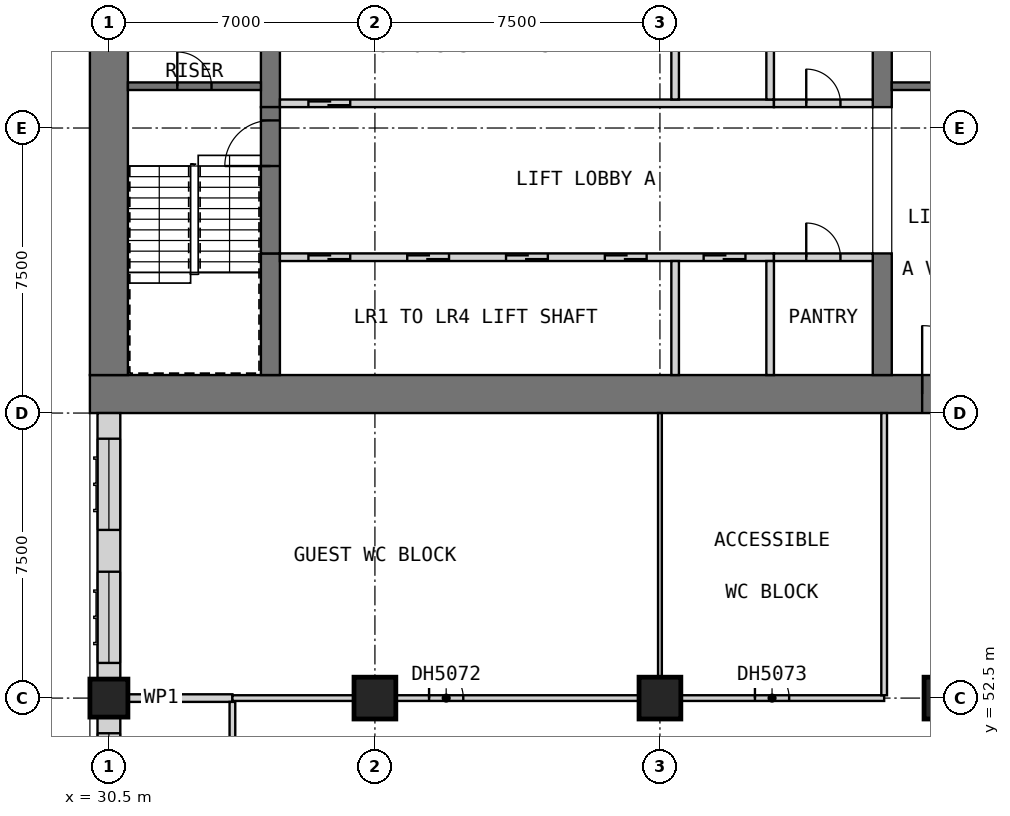
"""IFC4 building model, lengths in metres.
Left out: names, types, materials, properties, quantities, classifications, styles, units other than length and angle.
Written with IfcOpenShell. Run it as: python <this file> out.ifc"""

import sys

from ifc_helpers import new_model, si_unit, direction, frame, frame_2d, origin, origin_2d, place, context, subcontext, project, spatial, rectangle, extrude, element, fill, save


model = new_model("IFC4")
c1 = context("Model", 3, precision=1e-05, world=origin(), true_north=direction((0.0, 1.0)))
c2 = subcontext(c1, "Body", "Model", "MODEL_VIEW")
j1 = project(units=[si_unit("LENGTHUNIT", "METRE"), si_unit("PLANEANGLEUNIT", "RADIAN")], contexts=[c1])
p1 = place(None, origin())
s1 = spatial("IfcSite", under=j1, at=p1, CompositionType="ELEMENT")
p2 = place(p1, origin())
s2 = spatial("IfcBuilding", under=s1, at=p2, CompositionType="ELEMENT")
p3 = place(p2, frame((0.0, 0.0, 79.1)))
s3 = spatial("IfcBuildingStorey", under=s2, at=p3, CompositionType="ELEMENT", Elevation=79.1)
p4 = place(p3, frame((30.5, 52.5, 0.0), z_axis=(0.0, 0.0, 1.0), x_axis=(1.0, 0.0, 0.0)))
e1 = element("IfcColumn", 1, at=p4, inside=s3, PredefinedType="COLUMN", context=c2, shape_type="SweptSolid", body=[
    extrude(rectangle(XDim=1.0, YDim=1.0, at=origin_2d()), origin(), (0.0, 0.0, 1.0), 3.6),
])
for number, where, z_axis, x_axis in (
    (2, (37.5, 52.5, 0.0), (0.0, 0.0, 1.0), (1.0, 0.0, 0.0)),
    (3, (45.0, 52.5, 0.0), (0.0, 0.0, 1.0), (1.0, 0.0, 0.0)),
    (4, (52.5, 52.5, 0.0), (0.0, 0.0, 1.0), (1.0, 0.0, 0.0)),
):
    element("IfcColumn", number, at=place(p3, frame(where, z_axis=z_axis, x_axis=x_axis)), inside=s3, PredefinedType="COLUMN", context=c2, shape_type="SweptSolid", body=[
        extrude(rectangle(XDim=1.1, YDim=1.1, at=origin_2d()), origin(), (0.0, 0.0, 1.0), 3.6),
    ])
p5 = place(p3, frame((30.0, 60.5, 0.0), z_axis=(0.0, 0.0, 1.0), x_axis=(1.0, 0.0, 0.0)))
e5 = element("IfcWall", 5, at=p5, inside=s3, PredefinedType="SHEAR", context=c2, shape_type="SweptSolid", body=[
    extrude(rectangle(XDim=30.0, YDim=1.0, at=frame_2d((15.0, 0.0))), origin(), (0.0, 0.0, 1.0), 3.6),
])
p6 = place(p5, frame((21.9, 0.0, 0.0)))
e6 = element("IfcOpeningElement", 6, at=p6, cuts=e5, PredefinedType="OPENING", context=c2, shape_type="SweptSolid", body=[
    extrude(rectangle(XDim=1.8, YDim=2.1, at=frame_2d((0.9, 1.05))), frame((0.0, 0.51, 0.0), z_axis=(0.0, -1.0, 0.0), x_axis=(1.0, 0.0, 0.0)), (0.0, 0.0, 1.0), 1.02),
])
p7 = place(p5, frame((26.5, 0.0, 0.0)))
e7 = element("IfcOpeningElement", 7, at=p7, cuts=e5, PredefinedType="OPENING", context=c2, shape_type="SweptSolid", body=[
    extrude(rectangle(XDim=1.2, YDim=2.1, at=frame_2d((0.6, 1.05))), frame((0.0, 0.51, 0.0), z_axis=(0.0, -1.0, 0.0), x_axis=(1.0, 0.0, 0.0)), (0.0, 0.0, 1.0), 1.02),
])
p8 = place(p3, frame((30.5, 61.0, 0.0), z_axis=(0.0, 0.0, 1.0), x_axis=(0.0, 1.0, 0.0)))
e8 = element("IfcWall", 8, at=p8, inside=s3, PredefinedType="SHEAR", context=c2, shape_type="SweptSolid", body=[
    extrude(rectangle(XDim=20.5, YDim=1.0, at=frame_2d((10.25, 0.0))), origin(), (0.0, 0.0, 1.0), 3.6),
])
p9 = place(p3, frame((34.75, 61.0, 0.0), z_axis=(0.0, 0.0, 1.0), x_axis=(0.0, 1.0, 0.0)))
e9 = element("IfcWall", 9, at=p9, inside=s3, PredefinedType="SHEAR", context=c2, shape_type="SweptSolid", body=[
    extrude(rectangle(XDim=3.2, YDim=0.5, at=frame_2d((1.6, 0.0))), origin(), (0.0, 0.0, 1.0), 3.6),
])
p10 = place(p3, frame((34.75, 68.05, 0.0), z_axis=(0.0, 0.0, 1.0), x_axis=(0.0, 1.0, 0.0)))
e10 = element("IfcWall", 10, at=p10, inside=s3, PredefinedType="SHEAR", context=c2, shape_type="SweptSolid", body=[
    extrude(rectangle(XDim=6.4, YDim=0.5, at=frame_2d((3.2, 0.0))), origin(), (0.0, 0.0, 1.0), 3.6),
])
p11 = place(p3, frame((50.85, 61.0, 0.0), z_axis=(0.0, 0.0, 1.0), x_axis=(0.0, 1.0, 0.0)))
e11 = element("IfcWall", 11, at=p11, inside=s3, PredefinedType="SHEAR", context=c2, shape_type="SweptSolid", body=[
    extrude(rectangle(XDim=3.2, YDim=0.5, at=frame_2d((1.6, 0.0))), origin(), (0.0, 0.0, 1.0), 3.6),
])
p12 = place(p3, frame((50.85, 68.05, 0.0), z_axis=(0.0, 0.0, 1.0), x_axis=(0.0, 1.0, 0.0)))
e12 = element("IfcWall", 12, at=p12, inside=s3, PredefinedType="SHEAR", context=c2, shape_type="SweptSolid", body=[
    extrude(rectangle(XDim=6.4, YDim=0.5, at=frame_2d((3.2, 0.0))), origin(), (0.0, 0.0, 1.0), 3.6),
])
p13 = place(p2, frame((0.0, 0.0, 34.0)))
s4 = spatial("IfcBuildingStorey", under=s2, at=p13, CompositionType="ELEMENT", Elevation=34.0)
for number, where, z_axis, x_axis in (
    (13, (29.7, 61.05, 0.0), (0.0, 0.0, 1.0), (0.0, 1.0, 0.0)),
    (14, (29.7, 65.925, 0.0), (0.0, 0.0, 1.0), (0.0, 1.0, 0.0)),
):
    element("IfcWall", number, at=place(p13, frame(where, z_axis=z_axis, x_axis=x_axis)), inside=s4, PredefinedType="SOLIDWALL", context=c2, shape_type="SweptSolid", body=[
        extrude(rectangle(XDim=0.9, YDim=0.6, at=frame_2d((0.45, 0.0))), origin(), (0.0, 0.0, 1.0), 286.2),
    ])
p14 = place(p3, frame((30.5, 60.0, 0.0), z_axis=(0.0, 0.0, 1.0), x_axis=(0.0, -1.0, 0.0)))
e15 = element("IfcWall", 15, at=p14, inside=s3, PredefinedType="SOLIDWALL", context=c2, shape_type="SweptSolid", body=[
    extrude(rectangle(XDim=7.0, YDim=0.6, at=frame_2d((3.5, 0.0))), origin(), (0.0, 0.0, 1.0), 3.35),
])
p15 = place(p14, frame((4.175, 0.0, 0.8)))
e16 = element("IfcOpeningElement", 16, at=p15, cuts=e15, PredefinedType="OPENING", context=c2, shape_type="SweptSolid", body=[
    extrude(rectangle(XDim=2.4, YDim=1.8, at=frame_2d((1.2, 0.9))), frame((0.0, 0.31, 0.0), z_axis=(0.0, -1.0, 0.0), x_axis=(1.0, 0.0, 0.0)), (0.0, 0.0, 1.0), 0.62),
])
p16 = place(p14, frame((0.675, 0.0, 0.8)))
e17 = element("IfcOpeningElement", 17, at=p16, cuts=e15, PredefinedType="OPENING", context=c2, shape_type="SweptSolid", body=[
    extrude(rectangle(XDim=2.4, YDim=1.8, at=frame_2d((1.2, 0.9))), frame((0.0, 0.31, 0.0), z_axis=(0.0, -1.0, 0.0), x_axis=(1.0, 0.0, 0.0)), (0.0, 0.0, 1.0), 0.62),
])
p17 = place(p3, frame((30.5, 52.0, 0.0), z_axis=(0.0, 0.0, 1.0), x_axis=(0.0, -1.0, 0.0)))
e18 = element("IfcWall", 18, at=p17, inside=s3, PredefinedType="SOLIDWALL", context=c2, shape_type="SweptSolid", body=[
    extrude(rectangle(XDim=6.0, YDim=0.6, at=frame_2d((3.0, 0.0))), origin(), (0.0, 0.0, 1.0), 2.85),
])
p18 = place(p17, frame((3.425, 0.0, 0.8)))
e19 = element("IfcOpeningElement", 19, at=p18, cuts=e18, PredefinedType="OPENING", context=c2, shape_type="SweptSolid", body=[
    extrude(rectangle(XDim=2.4, YDim=1.8, at=frame_2d((1.2, 0.9))), frame((0.0, 0.31, 0.0), z_axis=(0.0, -1.0, 0.0), x_axis=(1.0, 0.0, 0.0)), (0.0, 0.0, 1.0), 0.62),
])
p19 = place(p17, frame((0.425, 0.0, 0.8)))
e20 = element("IfcOpeningElement", 20, at=p19, cuts=e18, PredefinedType="OPENING", context=c2, shape_type="SweptSolid", body=[
    extrude(rectangle(XDim=2.4, YDim=1.8, at=frame_2d((1.2, 0.9))), frame((0.0, 0.31, 0.0), z_axis=(0.0, -1.0, 0.0), x_axis=(1.0, 0.0, 0.0)), (0.0, 0.0, 1.0), 0.62),
])
p20 = place(p3, frame((35.0, 64.1, 0.0), z_axis=(0.0, 0.0, 1.0), x_axis=(1.0, 0.0, 0.0)))
e21 = element("IfcWall", 21, at=p20, inside=s3, PredefinedType="SOLIDWALL", context=c2, shape_type="SweptSolid", body=[
    extrude(rectangle(XDim=13.0, YDim=0.2, at=frame_2d((6.5, 0.0))), origin(), (0.0, 0.0, 1.0), 3.6),
])
p21 = place(p20, frame((0.75, 0.0, 0.0)))
e22 = element("IfcOpeningElement", 22, at=p21, cuts=e21, PredefinedType="OPENING", context=c2, shape_type="SweptSolid", body=[
    extrude(rectangle(XDim=1.1, YDim=2.1, at=frame_2d((0.55, 1.05))), frame((0.0, 0.11, 0.0), z_axis=(0.0, -1.0, 0.0), x_axis=(1.0, 0.0, 0.0)), (0.0, 0.0, 1.0), 0.22),
])
p22 = place(p20, frame((3.35, 0.0, 0.0)))
e23 = element("IfcOpeningElement", 23, at=p22, cuts=e21, PredefinedType="OPENING", context=c2, shape_type="SweptSolid", body=[
    extrude(rectangle(XDim=1.1, YDim=2.1, at=frame_2d((0.55, 1.05))), frame((0.0, 0.11, 0.0), z_axis=(0.0, -1.0, 0.0), x_axis=(1.0, 0.0, 0.0)), (0.0, 0.0, 1.0), 0.22),
])
p23 = place(p20, frame((5.95, 0.0, 0.0)))
e24 = element("IfcOpeningElement", 24, at=p23, cuts=e21, PredefinedType="OPENING", context=c2, shape_type="SweptSolid", body=[
    extrude(rectangle(XDim=1.1, YDim=2.1, at=frame_2d((0.55, 1.05))), frame((0.0, 0.11, 0.0), z_axis=(0.0, -1.0, 0.0), x_axis=(1.0, 0.0, 0.0)), (0.0, 0.0, 1.0), 0.22),
])
p24 = place(p20, frame((8.55, 0.0, 0.0)))
e25 = element("IfcOpeningElement", 25, at=p24, cuts=e21, PredefinedType="OPENING", context=c2, shape_type="SweptSolid", body=[
    extrude(rectangle(XDim=1.1, YDim=2.1, at=frame_2d((0.55, 1.05))), frame((0.0, 0.11, 0.0), z_axis=(0.0, -1.0, 0.0), x_axis=(1.0, 0.0, 0.0)), (0.0, 0.0, 1.0), 0.22),
])
p25 = place(p20, frame((11.15, 0.0, 0.0)))
e26 = element("IfcOpeningElement", 26, at=p25, cuts=e21, PredefinedType="OPENING", context=c2, shape_type="SweptSolid", body=[
    extrude(rectangle(XDim=1.1, YDim=2.1, at=frame_2d((0.55, 1.05))), frame((0.0, 0.11, 0.0), z_axis=(0.0, -1.0, 0.0), x_axis=(1.0, 0.0, 0.0)), (0.0, 0.0, 1.0), 0.22),
])
for number, where, z_axis, x_axis in (
    (27, (45.4, 61.0, 0.0), (0.0, 0.0, 1.0), (0.0, 1.0, 0.0)),
    (28, (47.9, 61.0, 0.0), (0.0, 0.0, 1.0), (0.0, 1.0, 0.0)),
):
    element("IfcWall", number, at=place(p3, frame(where, z_axis=z_axis, x_axis=x_axis)), inside=s3, PredefinedType="SOLIDWALL", context=c2, shape_type="SweptSolid", body=[
        extrude(rectangle(XDim=3.0, YDim=0.2, at=frame_2d((1.5, 0.0))), origin(), (0.0, 0.0, 1.0), 3.6),
    ])
p26 = place(p3, frame((48.0, 64.1, 0.0), z_axis=(0.0, 0.0, 1.0), x_axis=(1.0, 0.0, 0.0)))
e29 = element("IfcWall", 29, at=p26, inside=s3, PredefinedType="PARTITIONING", context=c2, shape_type="SweptSolid", body=[
    extrude(rectangle(XDim=2.6, YDim=0.2, at=frame_2d((1.3, 0.0))), origin(), (0.0, 0.0, 1.0), 3.35),
])
p27 = place(p26, frame((0.85, 0.0, 0.0)))
e30 = element("IfcOpeningElement", 30, at=p27, cuts=e29, PredefinedType="OPENING", context=c2, shape_type="SweptSolid", body=[
    extrude(rectangle(XDim=0.9, YDim=2.1, at=frame_2d((0.45, 1.05))), frame((0.0, 0.11, 0.0), z_axis=(0.0, -1.0, 0.0), x_axis=(1.0, 0.0, 0.0)), (0.0, 0.0, 1.0), 0.22),
])
p28 = place(p3, frame((35.0, 68.15, 0.0), z_axis=(0.0, 0.0, 1.0), x_axis=(1.0, 0.0, 0.0)))
e31 = element("IfcWall", 31, at=p28, inside=s3, PredefinedType="SOLIDWALL", context=c2, shape_type="SweptSolid", body=[
    extrude(rectangle(XDim=13.0, YDim=0.2, at=frame_2d((6.5, 0.0))), origin(), (0.0, 0.0, 1.0), 3.6),
])
p29 = place(p28, frame((0.75, 0.0, 0.0)))
e32 = element("IfcOpeningElement", 32, at=p29, cuts=e31, PredefinedType="OPENING", context=c2, shape_type="SweptSolid", body=[
    extrude(rectangle(XDim=1.1, YDim=2.1, at=frame_2d((0.55, 1.05))), frame((0.0, 0.11, 0.0), z_axis=(0.0, -1.0, 0.0), x_axis=(1.0, 0.0, 0.0)), (0.0, 0.0, 1.0), 0.22),
])
for number, where, z_axis, x_axis in (
    (33, (45.4, 68.25, 0.0), (0.0, 0.0, 1.0), (0.0, 1.0, 0.0)),
    (34, (47.9, 68.25, 0.0), (0.0, 0.0, 1.0), (0.0, 1.0, 0.0)),
):
    element("IfcWall", number, at=place(p3, frame(where, z_axis=z_axis, x_axis=x_axis)), inside=s3, PredefinedType="SOLIDWALL", context=c2, shape_type="SweptSolid", body=[
        extrude(rectangle(XDim=2.75, YDim=0.2, at=frame_2d((1.375, 0.0))), origin(), (0.0, 0.0, 1.0), 3.6),
    ])
p30 = place(p3, frame((48.0, 68.15, 0.0), z_axis=(0.0, 0.0, 1.0), x_axis=(1.0, 0.0, 0.0)))
e35 = element("IfcWall", 35, at=p30, inside=s3, PredefinedType="PARTITIONING", context=c2, shape_type="SweptSolid", body=[
    extrude(rectangle(XDim=2.6, YDim=0.2, at=frame_2d((1.3, 0.0))), origin(), (0.0, 0.0, 1.0), 3.35),
])
p31 = place(p30, frame((0.85, 0.0, 0.0)))
e36 = element("IfcOpeningElement", 36, at=p31, cuts=e35, PredefinedType="OPENING", context=c2, shape_type="SweptSolid", body=[
    extrude(rectangle(XDim=0.9, YDim=2.1, at=frame_2d((0.45, 1.05))), frame((0.0, 0.11, 0.0), z_axis=(0.0, -1.0, 0.0), x_axis=(1.0, 0.0, 0.0)), (0.0, 0.0, 1.0), 0.22),
])
p32 = place(p3, frame((34.75, 64.2, 0.0), z_axis=(0.0, 0.0, 1.0), x_axis=(0.0, 1.0, 0.0)))
e37 = element("IfcWall", 37, at=p32, inside=s3, PredefinedType="SOLIDWALL", context=c2, shape_type="SweptSolid", body=[
    extrude(rectangle(XDim=3.85, YDim=0.5, at=frame_2d((1.925, 0.0))), origin(), (0.0, 0.0, 1.0), 2.4),
])
p33 = place(p32, frame((2.3, 0.0, 0.0)))
e38 = element("IfcOpeningElement", 38, at=p33, cuts=e37, PredefinedType="OPENING", context=c2, shape_type="SweptSolid", body=[
    extrude(rectangle(XDim=1.2, YDim=2.1, at=frame_2d((0.6, 1.05))), frame((0.0, 0.26, 0.0), z_axis=(0.0, -1.0, 0.0), x_axis=(1.0, 0.0, 0.0)), (0.0, 0.0, 1.0), 0.52),
])
p34 = place(p3, frame((31.0, 68.6, 0.0), z_axis=(0.0, 0.0, 1.0), x_axis=(1.0, 0.0, 0.0)))
e39 = element("IfcWall", 39, at=p34, inside=s3, PredefinedType="SOLIDWALL", context=c2, shape_type="SweptSolid", body=[
    extrude(rectangle(XDim=3.5, YDim=0.2, at=frame_2d((1.75, 0.0))), origin(), (0.0, 0.0, 1.0), 3.35),
])
p35 = place(p34, frame((1.3, 0.0, 0.0)))
e40 = element("IfcOpeningElement", 40, at=p35, cuts=e39, PredefinedType="OPENING", context=c2, shape_type="SweptSolid", body=[
    extrude(rectangle(XDim=0.9, YDim=2.1, at=frame_2d((0.45, 1.05))), frame((0.0, 0.11, 0.0), z_axis=(0.0, -1.0, 0.0), x_axis=(1.0, 0.0, 0.0)), (0.0, 0.0, 1.0), 0.22),
])
p36 = place(p3, frame((51.1, 68.6, 0.0), z_axis=(0.0, 0.0, 1.0), x_axis=(1.0, 0.0, 0.0)))
e41 = element("IfcWall", 41, at=p36, inside=s3, PredefinedType="SOLIDWALL", context=c2, shape_type="SweptSolid", body=[
    extrude(rectangle(XDim=7.9, YDim=0.2, at=frame_2d((3.95, 0.0))), origin(), (0.0, 0.0, 1.0), 3.35),
])
p37 = place(p3, frame((30.0, 52.5, 0.0), z_axis=(0.0, 0.0, 1.0), x_axis=(1.0, 0.0, 0.0)))
e42 = element("IfcWall", 42, at=p37, inside=s3, PredefinedType="PARTITIONING", context=c2, shape_type="SweptSolid", body=[
    extrude(rectangle(XDim=3.75, YDim=0.2, at=frame_2d((1.875, 0.0))), origin(), (0.0, 0.0, 1.0), 3.35),
])
p38 = place(p3, frame((33.75, 52.5, 0.0), z_axis=(0.0, 0.0, 1.0), x_axis=(1.0, 0.0, 0.0)))
e43 = element("IfcWall", 43, at=p38, inside=s3, PredefinedType="PARTITIONING", context=c2, shape_type="SweptSolid", body=[
    extrude(rectangle(XDim=17.15, YDim=0.15, at=frame_2d((8.575, 0.0))), origin(), (0.0, 0.0, 1.0), 3.35),
])
p39 = place(p38, frame((5.175, 0.0, 0.0)))
e44 = element("IfcOpeningElement", 44, at=p39, cuts=e43, PredefinedType="OPENING", context=c2, shape_type="SweptSolid", body=[
    extrude(rectangle(XDim=0.9, YDim=2.1, at=frame_2d((0.45, 1.05))), frame((0.0, 0.085, 0.0), z_axis=(0.0, -1.0, 0.0), x_axis=(1.0, 0.0, 0.0)), (0.0, 0.0, 1.0), 0.17),
])
p40 = place(p38, frame((13.75, 0.0, 0.0)))
e45 = element("IfcOpeningElement", 45, at=p40, cuts=e43, PredefinedType="OPENING", context=c2, shape_type="SweptSolid", body=[
    extrude(rectangle(XDim=0.9, YDim=2.1, at=frame_2d((0.45, 1.05))), frame((0.0, 0.085, 0.0), z_axis=(0.0, -1.0, 0.0), x_axis=(1.0, 0.0, 0.0)), (0.0, 0.0, 1.0), 0.17),
])
p41 = place(p3, frame((33.75, 50.175, 0.0), z_axis=(0.0, 0.0, 1.0), x_axis=(0.0, 1.0, 0.0)))
e46 = element("IfcWall", 46, at=p41, inside=s3, PredefinedType="PARTITIONING", context=c2, shape_type="SweptSolid", body=[
    extrude(rectangle(XDim=2.225, YDim=0.15, at=frame_2d((1.112, 0.0))), origin(), (0.0, 0.0, 1.0), 3.35),
])
p42 = place(p3, frame((45.0, 52.575, 0.0), z_axis=(0.0, 0.0, 1.0), x_axis=(0.0, 1.0, 0.0)))
e47 = element("IfcWall", 47, at=p42, inside=s3, PredefinedType="PARTITIONING", context=c2, shape_type="SweptSolid", body=[
    extrude(rectangle(XDim=7.425, YDim=0.1, at=frame_2d((3.712, 0.0))), origin(), (0.0, 0.0, 1.0), 3.35),
])
p43 = place(p3, frame((50.9, 52.575, 0.0), z_axis=(0.0, 0.0, 1.0), x_axis=(0.0, 1.0, 0.0)))
e48 = element("IfcWall", 48, at=p43, inside=s3, PredefinedType="PARTITIONING", context=c2, shape_type="SweptSolid", body=[
    extrude(rectangle(XDim=7.425, YDim=0.15, at=frame_2d((3.712, 0.0))), origin(), (0.0, 0.0, 1.0), 3.35),
])
p44 = place(p15, origin())
e49 = element("IfcWindow", 49, at=p44, inside=s3, PartitioningType="SINGLE_PANEL", PredefinedType="WINDOW", context=c2, shape_type="SweptSolid", body=[
    extrude(rectangle(XDim=2.4, YDim=1.8, at=frame_2d((1.2, 0.9))), frame((0.0, -0.07, 0.0), z_axis=(0.0, -1.0, 0.0), x_axis=(1.0, 0.0, 0.0)), (0.0, 0.0, 1.0), 0.06),
])
fill(e16, e49)
p45 = place(p16, origin())
e50 = element("IfcWindow", 50, at=p45, inside=s3, PartitioningType="SINGLE_PANEL", PredefinedType="WINDOW", context=c2, shape_type="SweptSolid", body=[
    extrude(rectangle(XDim=2.4, YDim=1.8, at=frame_2d((1.2, 0.9))), frame((0.0, -0.07, 0.0), z_axis=(0.0, -1.0, 0.0), x_axis=(1.0, 0.0, 0.0)), (0.0, 0.0, 1.0), 0.06),
])
fill(e17, e50)
p46 = place(p19, origin())
e51 = element("IfcWindow", 51, at=p46, inside=s3, PartitioningType="SINGLE_PANEL", PredefinedType="WINDOW", context=c2, shape_type="SweptSolid", body=[
    extrude(rectangle(XDim=2.4, YDim=1.8, at=frame_2d((1.2, 0.9))), frame((0.0, -0.07, 0.0), z_axis=(0.0, -1.0, 0.0), x_axis=(1.0, 0.0, 0.0)), (0.0, 0.0, 1.0), 0.06),
])
fill(e20, e51)
p47 = place(p21, origin())
e52 = element("IfcDoor", 52, at=p47, inside=s3, OperationType="DOUBLE_DOOR_SLIDING", PredefinedType="DOOR", context=c2, shape_type="SweptSolid", body=[
    extrude(rectangle(XDim=1.1, YDim=2.1, at=frame_2d((0.55, 1.05))), frame((0.0, 0.025, 0.0), z_axis=(0.0, -1.0, 0.0), x_axis=(1.0, 0.0, 0.0)), (0.0, 0.0, 1.0), 0.05),
])
fill(e22, e52)
p48 = place(p22, origin())
e53 = element("IfcDoor", 53, at=p48, inside=s3, OperationType="DOUBLE_DOOR_SLIDING", PredefinedType="DOOR", context=c2, shape_type="SweptSolid", body=[
    extrude(rectangle(XDim=1.1, YDim=2.1, at=frame_2d((0.55, 1.05))), frame((0.0, 0.025, 0.0), z_axis=(0.0, -1.0, 0.0), x_axis=(1.0, 0.0, 0.0)), (0.0, 0.0, 1.0), 0.05),
])
fill(e23, e53)
p49 = place(p23, origin())
e54 = element("IfcDoor", 54, at=p49, inside=s3, OperationType="DOUBLE_DOOR_SLIDING", PredefinedType="DOOR", context=c2, shape_type="SweptSolid", body=[
    extrude(rectangle(XDim=1.1, YDim=2.1, at=frame_2d((0.55, 1.05))), frame((0.0, 0.025, 0.0), z_axis=(0.0, -1.0, 0.0), x_axis=(1.0, 0.0, 0.0)), (0.0, 0.0, 1.0), 0.05),
])
fill(e24, e54)
p50 = place(p24, origin())
e55 = element("IfcDoor", 55, at=p50, inside=s3, OperationType="DOUBLE_DOOR_SLIDING", PredefinedType="DOOR", context=c2, shape_type="SweptSolid", body=[
    extrude(rectangle(XDim=1.1, YDim=2.1, at=frame_2d((0.55, 1.05))), frame((0.0, 0.025, 0.0), z_axis=(0.0, -1.0, 0.0), x_axis=(1.0, 0.0, 0.0)), (0.0, 0.0, 1.0), 0.05),
])
fill(e25, e55)
p51 = place(p25, origin())
e56 = element("IfcDoor", 56, at=p51, inside=s3, OperationType="DOUBLE_DOOR_SLIDING", PredefinedType="DOOR", context=c2, shape_type="SweptSolid", body=[
    extrude(rectangle(XDim=1.1, YDim=2.1, at=frame_2d((0.55, 1.05))), frame((0.0, 0.025, 0.0), z_axis=(0.0, -1.0, 0.0), x_axis=(1.0, 0.0, 0.0)), (0.0, 0.0, 1.0), 0.05),
])
fill(e26, e56)
p52 = place(p27, origin())
e57 = element("IfcDoor", 57, at=p52, inside=s3, OperationType="SINGLE_SWING_RIGHT", PredefinedType="DOOR", context=c2, shape_type="SweptSolid", body=[
    extrude(rectangle(XDim=0.9, YDim=2.1, at=frame_2d((0.45, 1.05))), frame((0.0, 0.025, 0.0), z_axis=(0.0, -1.0, 0.0), x_axis=(1.0, 0.0, 0.0)), (0.0, 0.0, 1.0), 0.05),
])
fill(e30, e57)
p53 = place(p29, origin())
e58 = element("IfcDoor", 58, at=p53, inside=s3, OperationType="DOUBLE_DOOR_SLIDING", PredefinedType="DOOR", context=c2, shape_type="SweptSolid", body=[
    extrude(rectangle(XDim=1.1, YDim=2.1, at=frame_2d((0.55, 1.05))), frame((0.0, 0.025, 0.0), z_axis=(0.0, -1.0, 0.0), x_axis=(1.0, 0.0, 0.0)), (0.0, 0.0, 1.0), 0.05),
])
fill(e32, e58)
p54 = place(p31, origin())
e59 = element("IfcDoor", 59, at=p54, inside=s3, OperationType="SINGLE_SWING_RIGHT", PredefinedType="DOOR", context=c2, shape_type="SweptSolid", body=[
    extrude(rectangle(XDim=0.9, YDim=2.1, at=frame_2d((0.45, 1.05))), frame((0.0, 0.025, 0.0), z_axis=(0.0, -1.0, 0.0), x_axis=(1.0, 0.0, 0.0)), (0.0, 0.0, 1.0), 0.05),
])
fill(e36, e59)
p55 = place(p6, origin())
e60 = element("IfcDoor", 60, at=p55, inside=s3, OperationType="DOUBLE_DOOR_SINGLE_SWING", PredefinedType="DOOR", context=c2, shape_type="SweptSolid", body=[
    extrude(rectangle(XDim=1.8, YDim=2.1, at=frame_2d((0.9, 1.05))), frame((0.0, 0.025, 0.0), z_axis=(0.0, -1.0, 0.0), x_axis=(1.0, 0.0, 0.0)), (0.0, 0.0, 1.0), 0.05),
])
fill(e6, e60)
p56 = place(p33, origin())
e61 = element("IfcDoor", 61, at=p56, inside=s3, OperationType="SINGLE_SWING_LEFT", PredefinedType="DOOR", context=c2, shape_type="SweptSolid", body=[
    extrude(rectangle(XDim=1.2, YDim=2.1, at=frame_2d((0.6, 1.05))), frame((0.0, 0.025, 0.0), z_axis=(0.0, -1.0, 0.0), x_axis=(1.0, 0.0, 0.0)), (0.0, 0.0, 1.0), 0.05),
])
fill(e38, e61)
p57 = place(p35, origin())
e62 = element("IfcDoor", 62, at=p57, inside=s3, OperationType="SINGLE_SWING_LEFT", PredefinedType="DOOR", context=c2, shape_type="SweptSolid", body=[
    extrude(rectangle(XDim=0.9, YDim=2.1, at=frame_2d((0.45, 1.05))), frame((0.0, 0.025, 0.0), z_axis=(0.0, -1.0, 0.0), x_axis=(1.0, 0.0, 0.0)), (0.0, 0.0, 1.0), 0.05),
])
fill(e40, e62)
p58 = place(p39, origin())
e63 = element("IfcDoor", 63, at=p58, inside=s3, OperationType="SINGLE_SWING_LEFT", PredefinedType="DOOR", context=c2, shape_type="SweptSolid", body=[
    extrude(rectangle(XDim=0.9, YDim=2.1, at=frame_2d((0.45, 1.05))), frame((0.0, 0.025, 0.0), z_axis=(0.0, -1.0, 0.0), x_axis=(1.0, 0.0, 0.0)), (0.0, 0.0, 1.0), 0.05),
])
fill(e44, e63)
p59 = place(p40, origin())
e64 = element("IfcDoor", 64, at=p59, inside=s3, OperationType="SINGLE_SWING_LEFT", PredefinedType="DOOR", context=c2, shape_type="SweptSolid", body=[
    extrude(rectangle(XDim=0.9, YDim=2.1, at=frame_2d((0.45, 1.05))), frame((0.0, 0.025, 0.0), z_axis=(0.0, -1.0, 0.0), x_axis=(1.0, 0.0, 0.0)), (0.0, 0.0, 1.0), 0.05),
])
fill(e45, e64)
save(model, sys.argv[1])
